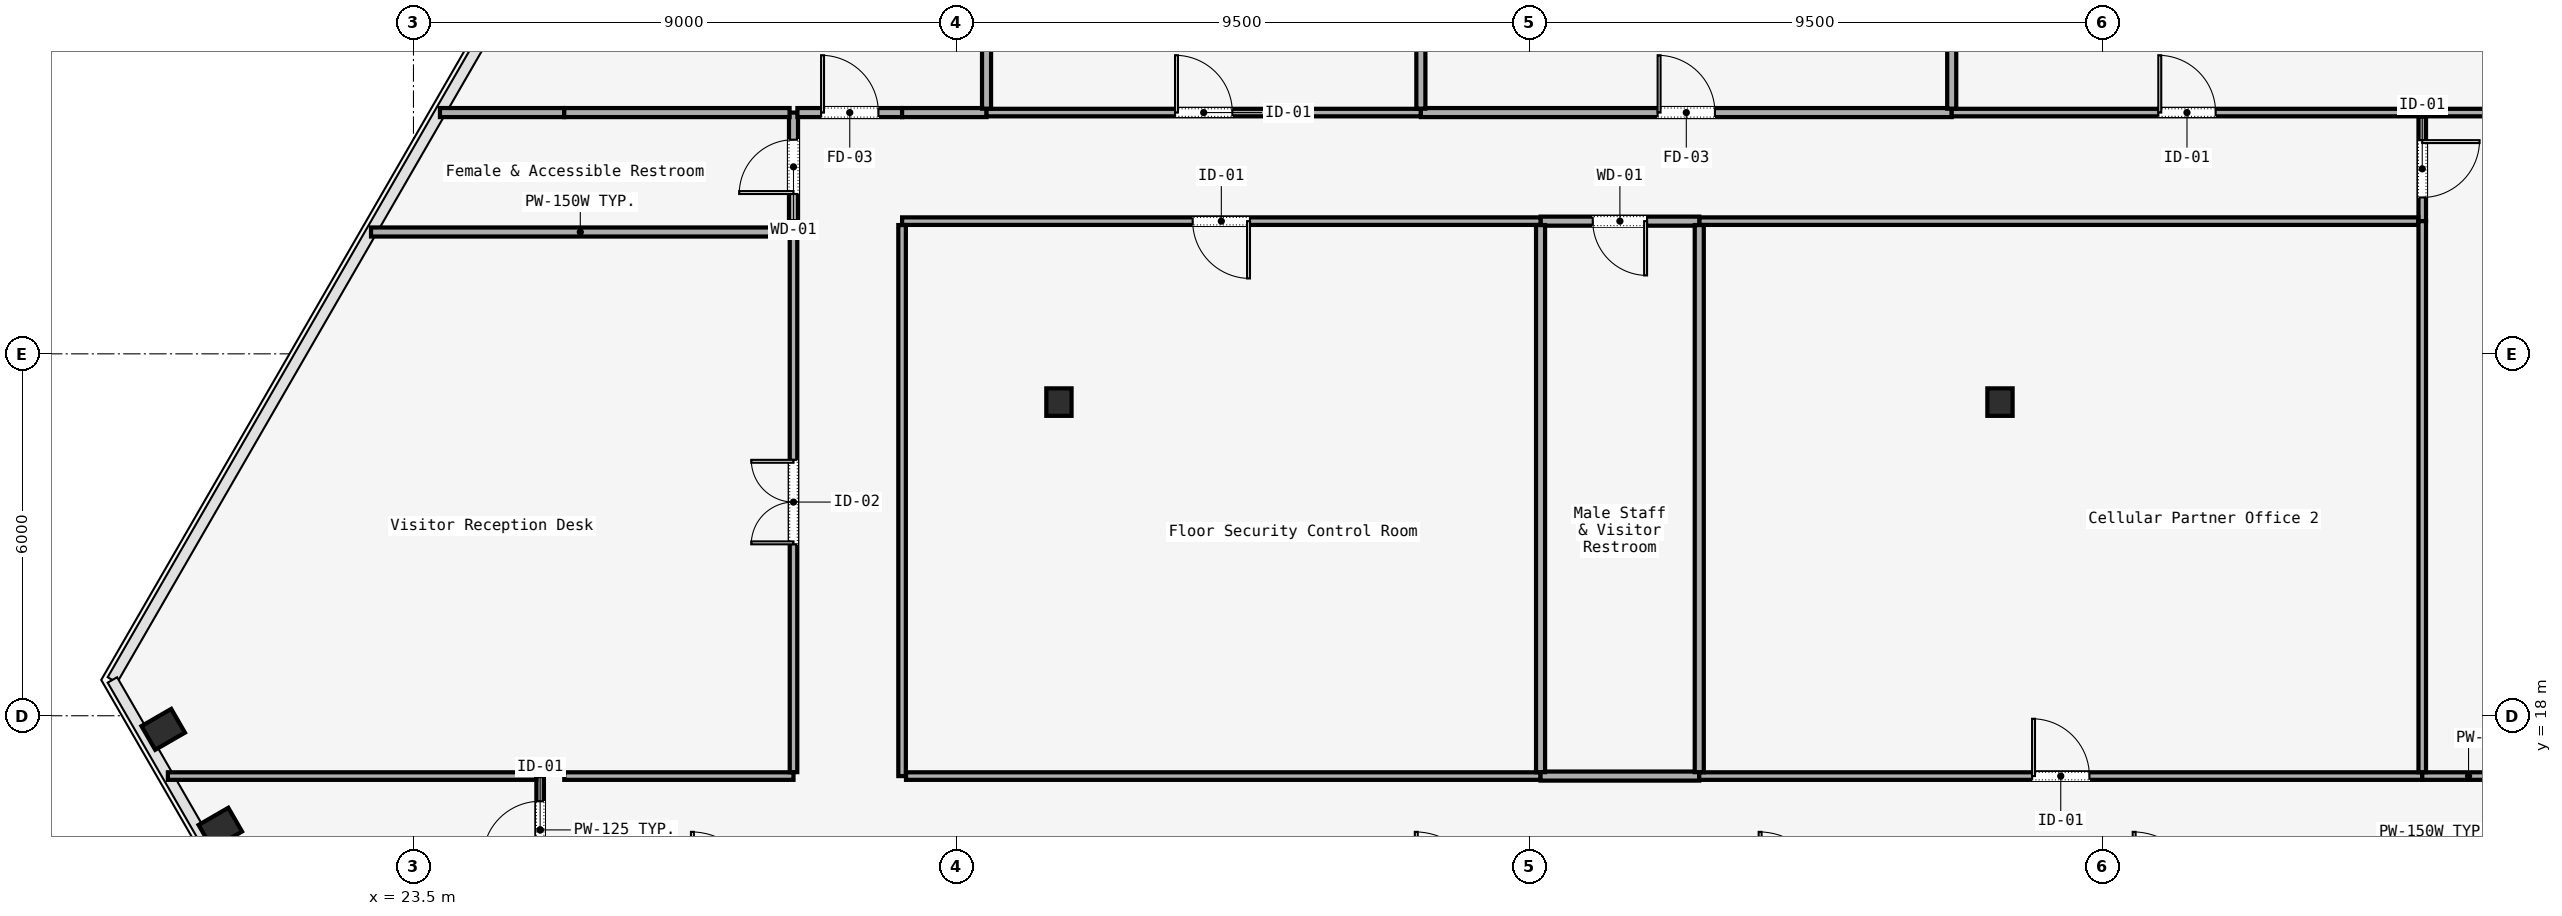
"""IFC4 building model, lengths in metres.
Left out: names, types, materials, properties, quantities, classifications, styles, units other than length and angle.
Written with IfcOpenShell. Run it as: python <this file> out.ifc"""

import sys

from ifc_helpers import new_model, si_unit, direction, frame, frame_2d, origin, origin_2d, place, context, subcontext, project, spatial, rectangle, i_section, extrude, element, fill, save


model = new_model("IFC4")
c1 = context("Model", 3, precision=1e-05, world=origin(), true_north=direction((0.0, 1.0)))
c2 = subcontext(c1, "Body", "Model", "MODEL_VIEW")
j1 = project(units=[si_unit("LENGTHUNIT", "METRE"), si_unit("PLANEANGLEUNIT", "RADIAN")], contexts=[c1])
p1 = place(None, origin())
s1 = spatial("IfcSite", under=j1, at=p1, CompositionType="ELEMENT")
p2 = place(p1, origin())
s2 = spatial("IfcBuilding", under=s1, at=p2, CompositionType="ELEMENT")
p3 = place(p2, frame((0.0, 0.0, 58.8)))
s3 = spatial("IfcBuildingStorey", under=s2, at=p3, CompositionType="ELEMENT", Elevation=58.8)
for number, where, z_axis, x_axis in (
    (1, (34.2, 23.2, 0.0), (0.0, 0.0, 1.0), (1.0, 0.0, 0.0)),
    (2, (49.8, 23.2, 0.0), (0.0, 0.0, 1.0), (1.0, 0.0, 0.0)),
):
    element("IfcColumn", number, at=place(p3, frame(where, z_axis=z_axis, x_axis=x_axis)), inside=s3, PredefinedType="COLUMN", context=c2, shape_type="SweptSolid", body=[
        extrude(i_section(OverallWidth=0.418, OverallDepth=0.456, WebThickness=0.042, FlangeThickness=0.067, FilletRadius=0.015, at=origin_2d()), origin(), (0.0, 0.0, 1.0), 3.58),
    ])
for number, where, z_axis, x_axis in (
    (3, (19.352, 17.774, 0.0), (0.0, 0.0, 1.0), (-0.5, 0.866, 0.0)),
    (4, (20.298, 16.135, 0.0), (0.0, 0.0, 1.0), (-0.5, 0.866, 0.0)),
):
    element("IfcColumn", number, at=place(p3, frame(where, z_axis=z_axis, x_axis=x_axis)), inside=s3, PredefinedType="COLUMN", context=c2, shape_type="SweptSolid", body=[
        extrude(i_section(OverallWidth=0.454, OverallDepth=0.569, WebThickness=0.078, FlangeThickness=0.08, FilletRadius=0.015, at=origin_2d()), origin(), (0.0, 0.0, 1.0), 3.58),
    ])
p4 = place(p3, frame((25.6, 15.215, 0.0), z_axis=(0.0, 0.0, 1.0), x_axis=(0.0, 1.0, 0.0)))
e5 = element("IfcWall", 5, at=p4, inside=s3, PredefinedType="PARTITIONING", context=c2, shape_type="SweptSolid", body=[
    extrude(rectangle(XDim=1.785, YDim=0.125, at=frame_2d((0.893, 0.0))), origin(), (0.0, 0.0, 1.0), 2.933),
])
p5 = place(p4, frame((0.417, 0.0, 0.0)))
e6 = element("IfcOpeningElement", 6, at=p5, cuts=e5, PredefinedType="OPENING", context=c2, shape_type="SweptSolid", body=[
    extrude(rectangle(XDim=0.95, YDim=2.2, at=frame_2d((0.475, 1.1))), frame((0.0, 0.062, 0.0), z_axis=(0.0, -1.0, 0.0), x_axis=(1.0, 0.0, 0.0)), (0.0, 0.0, 1.0), 0.125),
])
p6 = place(p3, frame((26.0, 17.0, 0.0), z_axis=(0.0, 0.0, 1.0), x_axis=(1.0, 0.0, 0.0)))
e7 = element("IfcWall", 7, at=p6, inside=s3, PredefinedType="PARTITIONING", context=c2, shape_type="SweptSolid", body=[
    extrude(rectangle(XDim=3.8, YDim=0.125, at=frame_2d((1.9, 0.0))), origin(), (0.0, 0.0, 1.0), 2.933),
])
p7 = place(p3, frame((29.8, 17.065, 0.0), z_axis=(0.0, 0.0, 1.0), x_axis=(0.0, 1.0, 0.0)))
e8 = element("IfcWall", 8, at=p7, inside=s3, PredefinedType="PARTITIONING", context=c2, shape_type="SweptSolid", body=[
    extrude(rectangle(XDim=8.955, YDim=0.125, at=frame_2d((4.478, 0.0))), origin(), (0.0, 0.0, 1.0), 2.933),
])
p8 = place(p7, frame((3.778, 0.0, 0.0)))
e9 = element("IfcOpeningElement", 9, at=p8, cuts=e8, PredefinedType="OPENING", context=c2, shape_type="SweptSolid", body=[
    extrude(rectangle(XDim=1.4, YDim=2.2, at=frame_2d((0.7, 1.1))), frame((0.0, 0.062, 0.0), z_axis=(0.0, -1.0, 0.0), x_axis=(1.0, 0.0, 0.0)), (0.0, 0.0, 1.0), 0.125),
])
p9 = place(p3, frame((29.8, 26.2, 0.0), z_axis=(0.0, 0.0, 1.0), x_axis=(0.0, 1.0, 0.0)))
e10 = element("IfcWall", 10, at=p9, inside=s3, PredefinedType="PARTITIONING", context=c2, shape_type="SweptSolid", body=[
    extrude(rectangle(XDim=1.8, YDim=0.15, at=frame_2d((0.9, 0.0))), origin(), (0.0, 0.0, 1.0), 2.933),
])
p10 = place(p9, frame((0.45, 0.0, 0.0)))
e11 = element("IfcOpeningElement", 11, at=p10, cuts=e10, PredefinedType="OPENING", context=c2, shape_type="SweptSolid", body=[
    extrude(rectangle(XDim=0.9, YDim=2.15, at=frame_2d((0.45, 1.075))), frame((0.0, 0.075, 0.0), z_axis=(0.0, -1.0, 0.0), x_axis=(1.0, 0.0, 0.0)), (0.0, 0.0, 1.0), 0.15),
])
p11 = place(p3, frame((29.865, 28.0, 0.0), z_axis=(0.0, 0.0, 1.0), x_axis=(1.0, 0.0, 0.0)))
e12 = element("IfcWall", 12, at=p11, inside=s3, PredefinedType="PARTITIONING", context=c2, shape_type="SweptSolid", body=[
    extrude(rectangle(XDim=1.735, YDim=0.15, at=frame_2d((0.868, 0.0))), origin(), (0.0, 0.0, 1.0), 2.933),
])
p12 = place(p11, frame((0.393, 0.0, 0.0)))
e13 = element("IfcOpeningElement", 13, at=p12, cuts=e12, PredefinedType="OPENING", context=c2, shape_type="SweptSolid", body=[
    extrude(rectangle(XDim=0.95, YDim=2.2, at=frame_2d((0.475, 1.1))), frame((0.0, 0.075, 0.0), z_axis=(0.0, -1.0, 0.0), x_axis=(1.0, 0.0, 0.0)), (0.0, 0.0, 1.0), 0.15),
])
p13 = place(p3, frame((31.6, 28.0, 0.0), z_axis=(0.0, 0.0, 1.0), x_axis=(1.0, 0.0, 0.0)))
e14 = element("IfcWall", 14, at=p13, inside=s3, PredefinedType="PARTITIONING", context=c2, shape_type="SweptSolid", body=[
    extrude(rectangle(XDim=1.4, YDim=0.15, at=frame_2d((0.7, 0.0))), origin(), (0.0, 0.0, 1.0), 2.933),
])
p14 = place(p3, frame((33.0, 28.0, 0.0), z_axis=(0.0, 0.0, 1.0), x_axis=(1.0, 0.0, 0.0)))
e15 = element("IfcWall", 15, at=p14, inside=s3, PredefinedType="PARTITIONING", context=c2, shape_type="SweptSolid", body=[
    extrude(rectangle(XDim=7.2, YDim=0.125, at=frame_2d((3.6, 0.0))), origin(), (0.0, 0.0, 1.0), 2.933),
])
p15 = place(p14, frame((3.125, 0.0, 0.0)))
e16 = element("IfcOpeningElement", 16, at=p15, cuts=e15, PredefinedType="OPENING", context=c2, shape_type="SweptSolid", body=[
    extrude(rectangle(XDim=0.95, YDim=2.2, at=frame_2d((0.475, 1.1))), frame((0.0, 0.062, 0.0), z_axis=(0.0, -1.0, 0.0), x_axis=(1.0, 0.0, 0.0)), (0.0, 0.0, 1.0), 0.125),
])
p16 = place(p3, frame((40.2, 28.0, 0.0), z_axis=(0.0, 0.0, 1.0), x_axis=(1.0, 0.0, 0.0)))
e17 = element("IfcWall", 17, at=p16, inside=s3, PredefinedType="PARTITIONING", context=c2, shape_type="SweptSolid", body=[
    extrude(rectangle(XDim=8.8, YDim=0.15, at=frame_2d((4.4, 0.0))), origin(), (0.0, 0.0, 1.0), 2.933),
])
p17 = place(p16, frame((3.925, 0.0, 0.0)))
e18 = element("IfcOpeningElement", 18, at=p17, cuts=e17, PredefinedType="OPENING", context=c2, shape_type="SweptSolid", body=[
    extrude(rectangle(XDim=0.95, YDim=2.2, at=frame_2d((0.475, 1.1))), frame((0.0, 0.075, 0.0), z_axis=(0.0, -1.0, 0.0), x_axis=(1.0, 0.0, 0.0)), (0.0, 0.0, 1.0), 0.15),
])
p18 = place(p3, frame((49.0, 28.0, 0.0), z_axis=(0.0, 0.0, 1.0), x_axis=(1.0, 0.0, 0.0)))
e19 = element("IfcWall", 19, at=p18, inside=s3, PredefinedType="PARTITIONING", context=c2, shape_type="SweptSolid", body=[
    extrude(rectangle(XDim=7.8, YDim=0.125, at=frame_2d((3.9, 0.0))), origin(), (0.0, 0.0, 1.0), 2.933),
])
p19 = place(p18, frame((3.425, 0.0, 0.0)))
e20 = element("IfcOpeningElement", 20, at=p19, cuts=e19, PredefinedType="OPENING", context=c2, shape_type="SweptSolid", body=[
    extrude(rectangle(XDim=0.95, YDim=2.2, at=frame_2d((0.475, 1.1))), frame((0.0, 0.062, 0.0), z_axis=(0.0, -1.0, 0.0), x_axis=(1.0, 0.0, 0.0)), (0.0, 0.0, 1.0), 0.125),
])
p20 = place(p3, frame((56.8, 27.935, 0.0), z_axis=(0.0, 0.0, 1.0), x_axis=(0.0, -1.0, 0.0)))
e21 = element("IfcWall", 21, at=p20, inside=s3, PredefinedType="PARTITIONING", context=c2, shape_type="SweptSolid", body=[
    extrude(rectangle(XDim=1.735, YDim=0.125, at=frame_2d((0.868, 0.0))), origin(), (0.0, 0.0, 1.0), 2.933),
])
p21 = place(p20, frame((0.393, 0.0, 0.0)))
e22 = element("IfcOpeningElement", 22, at=p21, cuts=e21, PredefinedType="OPENING", context=c2, shape_type="SweptSolid", body=[
    extrude(rectangle(XDim=0.95, YDim=2.2, at=frame_2d((0.475, 1.1))), frame((0.0, 0.062, 0.0), z_axis=(0.0, -1.0, 0.0), x_axis=(1.0, 0.0, 0.0)), (0.0, 0.0, 1.0), 0.125),
])
p22 = place(p3, frame((56.735, 26.2, 0.0), z_axis=(0.0, 0.0, 1.0), x_axis=(-1.0, 0.0, 0.0)))
e23 = element("IfcWall", 23, at=p22, inside=s3, PredefinedType="PARTITIONING", context=c2, shape_type="SweptSolid", body=[
    extrude(rectangle(XDim=11.92, YDim=0.125, at=frame_2d((5.96, 0.0))), origin(), (0.0, 0.0, 1.0), 2.933),
])
p23 = place(p3, frame((44.815, 26.2, 0.0), z_axis=(0.0, 0.0, 1.0), x_axis=(-1.0, 0.0, 0.0)))
e24 = element("IfcWall", 24, at=p23, inside=s3, PredefinedType="PARTITIONING", context=c2, shape_type="SweptSolid", body=[
    extrude(rectangle(XDim=2.631, YDim=0.15, at=frame_2d((1.315, 0.0))), origin(), (0.0, 0.0, 1.0), 2.933),
])
p24 = place(p23, frame((0.865, 0.0, 0.0)))
e25 = element("IfcOpeningElement", 25, at=p24, cuts=e24, PredefinedType="OPENING", context=c2, shape_type="SweptSolid", body=[
    extrude(rectangle(XDim=0.9, YDim=2.15, at=frame_2d((0.45, 1.075))), frame((0.0, 0.075, 0.0), z_axis=(0.0, -1.0, 0.0), x_axis=(1.0, 0.0, 0.0)), (0.0, 0.0, 1.0), 0.15),
])
p25 = place(p3, frame((42.184, 26.2, 0.0), z_axis=(0.0, 0.0, 1.0), x_axis=(-1.0, 0.0, 0.0)))
e26 = element("IfcWall", 26, at=p25, inside=s3, PredefinedType="PARTITIONING", context=c2, shape_type="SweptSolid", body=[
    extrude(rectangle(XDim=10.584, YDim=0.125, at=frame_2d((5.292, 0.0))), origin(), (0.0, 0.0, 1.0), 2.933),
])
p26 = place(p25, frame((4.817, 0.0, 0.0)))
e27 = element("IfcOpeningElement", 27, at=p26, cuts=e26, PredefinedType="OPENING", context=c2, shape_type="SweptSolid", body=[
    extrude(rectangle(XDim=0.95, YDim=2.2, at=frame_2d((0.475, 1.1))), frame((0.0, 0.062, 0.0), z_axis=(0.0, -1.0, 0.0), x_axis=(1.0, 0.0, 0.0)), (0.0, 0.0, 1.0), 0.125),
])
p27 = place(p3, frame((31.6, 26.135, 0.0), z_axis=(0.0, 0.0, 1.0), x_axis=(0.0, -1.0, 0.0)))
e28 = element("IfcWall", 28, at=p27, inside=s3, PredefinedType="PARTITIONING", context=c2, shape_type="SweptSolid", body=[
    extrude(rectangle(XDim=9.135, YDim=0.125, at=frame_2d((4.567, 0.0))), origin(), (0.0, 0.0, 1.0), 2.933),
])
p28 = place(p3, frame((31.665, 17.0, 0.0), z_axis=(0.0, 0.0, 1.0), x_axis=(1.0, 0.0, 0.0)))
e29 = element("IfcWall", 29, at=p28, inside=s3, PredefinedType="PARTITIONING", context=c2, shape_type="SweptSolid", body=[
    extrude(rectangle(XDim=10.519, YDim=0.125, at=frame_2d((5.26, 0.0))), origin(), (0.0, 0.0, 1.0), 2.933),
])
p29 = place(p3, frame((42.184, 17.0, 0.0), z_axis=(0.0, 0.0, 1.0), x_axis=(1.0, 0.0, 0.0)))
e30 = element("IfcWall", 30, at=p29, inside=s3, PredefinedType="PARTITIONING", context=c2, shape_type="SweptSolid", body=[
    extrude(rectangle(XDim=2.631, YDim=0.15, at=frame_2d((1.315, 0.0))), origin(), (0.0, 0.0, 1.0), 2.933),
])
p30 = place(p3, frame((44.815, 17.0, 0.0), z_axis=(0.0, 0.0, 1.0), x_axis=(1.0, 0.0, 0.0)))
e31 = element("IfcWall", 31, at=p30, inside=s3, PredefinedType="PARTITIONING", context=c2, shape_type="SweptSolid", body=[
    extrude(rectangle(XDim=11.985, YDim=0.125, at=frame_2d((5.993, 0.0))), origin(), (0.0, 0.0, 1.0), 2.933),
])
p31 = place(p30, frame((5.518, 0.0, 0.0)))
e32 = element("IfcOpeningElement", 32, at=p31, cuts=e31, PredefinedType="OPENING", context=c2, shape_type="SweptSolid", body=[
    extrude(rectangle(XDim=0.95, YDim=2.2, at=frame_2d((0.475, 1.1))), frame((0.0, 0.062, 0.0), z_axis=(0.0, -1.0, 0.0), x_axis=(1.0, 0.0, 0.0)), (0.0, 0.0, 1.0), 0.125),
])
p32 = place(p3, frame((56.8, 17.0, 0.0), z_axis=(0.0, 0.0, 1.0), x_axis=(1.0, 0.0, 0.0)))
e33 = element("IfcWall", 33, at=p32, inside=s3, PredefinedType="PARTITIONING", context=c2, shape_type="SweptSolid", body=[
    extrude(rectangle(XDim=1.535, YDim=0.125, at=frame_2d((0.768, 0.0))), origin(), (0.0, 0.0, 1.0), 2.933),
])
p33 = place(p3, frame((19.429, 17.0, 0.0), z_axis=(0.0, 0.0, 1.0), x_axis=(1.0, 0.0, 0.0)))
e34 = element("IfcWall", 34, at=p33, inside=s3, PredefinedType="PARTITIONING", context=c2, shape_type="SweptSolid", body=[
    extrude(rectangle(XDim=6.106, YDim=0.125, at=frame_2d((3.053, 0.0))), origin(), (0.0, 0.0, 1.0), 2.933),
])
p34 = place(p3, frame((22.796, 26.02, 0.0), z_axis=(0.0, 0.0, 1.0), x_axis=(1.0, 0.0, 0.0)))
e35 = element("IfcWall", 35, at=p34, inside=s3, PredefinedType="PARTITIONING", context=c2, shape_type="SweptSolid", body=[
    extrude(rectangle(XDim=6.939, YDim=0.15, at=frame_2d((3.469, 0.0))), origin(), (0.0, 0.0, 1.0), 2.933),
])
for number, where, z_axis, x_axis in (
    (36, (42.184, 26.135, 0.0), (0.0, 0.0, 1.0), (0.0, -1.0, 0.0)),
    (37, (44.815, 26.135, 0.0), (0.0, 0.0, 1.0), (0.0, -1.0, 0.0)),
):
    element("IfcWall", number, at=place(p3, frame(where, z_axis=z_axis, x_axis=x_axis)), inside=s3, PredefinedType="PARTITIONING", context=c2, shape_type="SweptSolid", body=[
        extrude(rectangle(XDim=9.07, YDim=0.15, at=frame_2d((4.535, 0.0))), origin(), (0.0, 0.0, 1.0), 2.933),
    ])
p35 = place(p3, frame((56.8, 26.2, 0.0), z_axis=(0.0, 0.0, 1.0), x_axis=(0.0, -1.0, 0.0)))
e38 = element("IfcWall", 38, at=p35, inside=s3, PredefinedType="PARTITIONING", context=c2, shape_type="SweptSolid", body=[
    extrude(rectangle(XDim=9.135, YDim=0.125, at=frame_2d((4.567, 0.0))), origin(), (0.0, 0.0, 1.0), 2.933),
])
p36 = place(p3, frame((56.8, 28.0, 0.0), z_axis=(0.0, 0.0, 1.0), x_axis=(1.0, 0.0, 0.0)))
e39 = element("IfcWall", 39, at=p36, inside=s3, PredefinedType="PARTITIONING", context=c2, shape_type="SweptSolid", body=[
    extrude(rectangle(XDim=3.26, YDim=0.125, at=frame_2d((1.63, 0.0))), origin(), (0.0, 0.0, 1.0), 2.933),
])
p37 = place(p3, frame((23.939, 28.0, 0.0), z_axis=(0.0, 0.0, 1.0), x_axis=(1.0, 0.0, 0.0)))
e40 = element("IfcWall", 40, at=p37, inside=s3, PredefinedType="PARTITIONING", context=c2, shape_type="SweptSolid", body=[
    extrude(rectangle(XDim=2.061, YDim=0.15, at=frame_2d((1.03, 0.0))), origin(), (0.0, 0.0, 1.0), 2.933),
])
p38 = place(p3, frame((26.0, 28.0, 0.0), z_axis=(0.0, 0.0, 1.0), x_axis=(1.0, 0.0, 0.0)))
e41 = element("IfcWall", 41, at=p38, inside=s3, PredefinedType="PARTITIONING", context=c2, shape_type="SweptSolid", body=[
    extrude(rectangle(XDim=3.735, YDim=0.15, at=frame_2d((1.868, 0.0))), origin(), (0.0, 0.0, 1.0), 2.933),
])
p39 = place(p3, frame((33.0, 43.693, 0.0), z_axis=(0.0, 0.0, 1.0), x_axis=(0.0, -1.0, 0.0)))
e42 = element("IfcWall", 42, at=p39, inside=s3, PredefinedType="PARTITIONING", context=c2, shape_type="SweptSolid", body=[
    extrude(rectangle(XDim=15.628, YDim=0.15, at=frame_2d((7.814, 0.0))), origin(), (0.0, 0.0, 1.0), 2.933),
])
for number, where, z_axis, x_axis in (
    (43, (49.0, 28.065, 0.0), (0.0, 0.0, 1.0), (0.0, 1.0, 0.0)),
    (44, (40.2, 45.848, 0.0), (0.0, 0.0, 1.0), (0.0, -1.0, 0.0)),
):
    element("IfcWall", number, at=place(p3, frame(where, z_axis=z_axis, x_axis=x_axis)), inside=s3, PredefinedType="PARTITIONING", context=c2, shape_type="SweptSolid", body=[
        extrude(rectangle(XDim=17.783, YDim=0.15, at=frame_2d((8.892, 0.0))), origin(), (0.0, 0.0, 1.0), 2.933),
    ])
p40 = place(p5, origin())
e45 = element("IfcDoor", 45, at=p40, inside=s3, OperationType="SINGLE_SWING_LEFT", PredefinedType="DOOR", context=c2, shape_type="SweptSolid", body=[
    extrude(rectangle(XDim=0.95, YDim=2.2, at=frame_2d((0.475, 1.1))), frame((0.0, 0.025, 0.0), z_axis=(0.0, -1.0, 0.0), x_axis=(1.0, 0.0, 0.0)), (0.0, 0.0, 1.0), 0.05),
])
fill(e6, e45)
p41 = place(p8, origin())
e46 = element("IfcDoor", 46, at=p41, inside=s3, OperationType="SINGLE_SWING_LEFT", PredefinedType="DOOR", context=c2, shape_type="SweptSolid", body=[
    extrude(rectangle(XDim=1.4, YDim=2.2, at=frame_2d((0.7, 1.1))), frame((0.0, 0.025, 0.0), z_axis=(0.0, -1.0, 0.0), x_axis=(1.0, 0.0, 0.0)), (0.0, 0.0, 1.0), 0.05),
])
fill(e9, e46)
p42 = place(p26, origin())
e47 = element("IfcDoor", 47, at=p42, inside=s3, OperationType="SINGLE_SWING_RIGHT", PredefinedType="DOOR", context=c2, shape_type="SweptSolid", body=[
    extrude(rectangle(XDim=0.95, YDim=2.2, at=frame_2d((0.475, 1.1))), frame((0.0, 0.025, 0.0), z_axis=(0.0, -1.0, 0.0), x_axis=(1.0, 0.0, 0.0)), (0.0, 0.0, 1.0), 0.05),
])
fill(e27, e47)
p43 = place(p24, origin())
e48 = element("IfcDoor", 48, at=p43, inside=s3, OperationType="SINGLE_SWING_LEFT", PredefinedType="DOOR", context=c2, shape_type="SweptSolid", body=[
    extrude(rectangle(XDim=0.9, YDim=2.15, at=frame_2d((0.45, 1.075))), frame((0.0, 0.025, 0.0), z_axis=(0.0, -1.0, 0.0), x_axis=(1.0, 0.0, 0.0)), (0.0, 0.0, 1.0), 0.05),
])
fill(e25, e48)
p44 = place(p31, origin())
e49 = element("IfcDoor", 49, at=p44, inside=s3, OperationType="SINGLE_SWING_RIGHT", PredefinedType="DOOR", context=c2, shape_type="SweptSolid", body=[
    extrude(rectangle(XDim=0.95, YDim=2.2, at=frame_2d((0.475, 1.1))), frame((0.0, 0.025, 0.0), z_axis=(0.0, -1.0, 0.0), x_axis=(1.0, 0.0, 0.0)), (0.0, 0.0, 1.0), 0.05),
])
fill(e32, e49)
p45 = place(p21, origin())
e50 = element("IfcDoor", 50, at=p45, inside=s3, OperationType="SINGLE_SWING_LEFT", PredefinedType="DOOR", context=c2, shape_type="SweptSolid", body=[
    extrude(rectangle(XDim=0.95, YDim=2.2, at=frame_2d((0.475, 1.1))), frame((0.0, 0.025, 0.0), z_axis=(0.0, -1.0, 0.0), x_axis=(1.0, 0.0, 0.0)), (0.0, 0.0, 1.0), 0.05),
])
fill(e22, e50)
p46 = place(p10, origin())
e51 = element("IfcDoor", 51, at=p46, inside=s3, OperationType="SINGLE_SWING_RIGHT", PredefinedType="DOOR", context=c2, shape_type="SweptSolid", body=[
    extrude(rectangle(XDim=0.9, YDim=2.15, at=frame_2d((0.45, 1.075))), frame((0.0, 0.025, 0.0), z_axis=(0.0, -1.0, 0.0), x_axis=(1.0, 0.0, 0.0)), (0.0, 0.0, 1.0), 0.05),
])
fill(e11, e51)
p47 = place(p12, origin())
e52 = element("IfcDoor", 52, at=p47, inside=s3, OperationType="SINGLE_SWING_LEFT", PredefinedType="DOOR", context=c2, shape_type="SweptSolid", body=[
    extrude(rectangle(XDim=0.95, YDim=2.2, at=frame_2d((0.475, 1.1))), frame((0.0, 0.025, 0.0), z_axis=(0.0, -1.0, 0.0), x_axis=(1.0, 0.0, 0.0)), (0.0, 0.0, 1.0), 0.05),
])
fill(e13, e52)
p48 = place(p19, origin())
e53 = element("IfcDoor", 53, at=p48, inside=s3, OperationType="SINGLE_SWING_RIGHT", PredefinedType="DOOR", context=c2, shape_type="SweptSolid", body=[
    extrude(rectangle(XDim=0.95, YDim=2.2, at=frame_2d((0.475, 1.1))), frame((0.0, 0.025, 0.0), z_axis=(0.0, -1.0, 0.0), x_axis=(1.0, 0.0, 0.0)), (0.0, 0.0, 1.0), 0.05),
])
fill(e20, e53)
p49 = place(p15, origin())
e54 = element("IfcDoor", 54, at=p49, inside=s3, OperationType="SINGLE_SWING_LEFT", PredefinedType="DOOR", context=c2, shape_type="SweptSolid", body=[
    extrude(rectangle(XDim=0.95, YDim=2.2, at=frame_2d((0.475, 1.1))), frame((0.0, 0.025, 0.0), z_axis=(0.0, -1.0, 0.0), x_axis=(1.0, 0.0, 0.0)), (0.0, 0.0, 1.0), 0.05),
])
fill(e16, e54)
p50 = place(p17, origin())
e55 = element("IfcDoor", 55, at=p50, inside=s3, OperationType="SINGLE_SWING_RIGHT", PredefinedType="DOOR", context=c2, shape_type="SweptSolid", body=[
    extrude(rectangle(XDim=0.95, YDim=2.2, at=frame_2d((0.475, 1.1))), frame((0.0, 0.025, 0.0), z_axis=(0.0, -1.0, 0.0), x_axis=(1.0, 0.0, 0.0)), (0.0, 0.0, 1.0), 0.05),
])
fill(e18, e55)
save(model, sys.argv[1])
